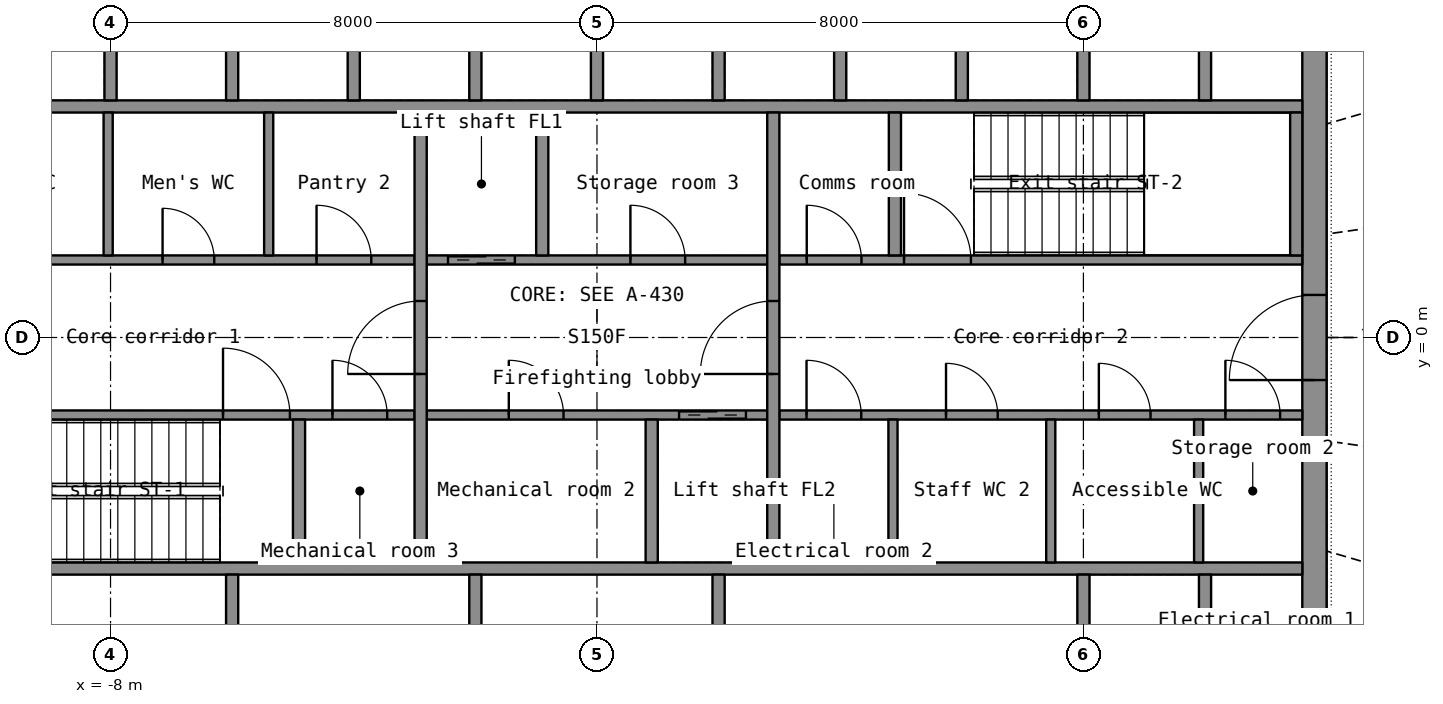
"""IFC4 building model, lengths in metres.
Left out: names, types, materials, properties, quantities, classifications, styles, units other than length and angle.
Written with IfcOpenShell. Run it as: python <this file> out.ifc"""

import sys

from ifc_helpers import new_model, si_unit, direction, frame, frame_2d, origin, place, context, subcontext, project, spatial, rectangle, extrude, element, fill, save


model = new_model("IFC4")
c1 = context("Model", 3, precision=1e-05, world=origin(), true_north=direction((0.0, 1.0)))
c2 = subcontext(c1, "Body", "Model", "MODEL_VIEW")
j1 = project(units=[si_unit("LENGTHUNIT", "METRE"), si_unit("PLANEANGLEUNIT", "RADIAN")], contexts=[c1])
p1 = place(None, origin())
s1 = spatial("IfcSite", under=j1, at=p1, CompositionType="ELEMENT")
p2 = place(p1, origin())
s2 = spatial("IfcBuilding", under=s1, at=p2, CompositionType="ELEMENT")
p3 = place(p2, frame((0.0, 0.0, 228.2)))
s3 = spatial("IfcBuildingStorey", under=s2, at=p3, CompositionType="ELEMENT", Elevation=228.2)
p4 = place(p3, frame((11.8, -7.2, 0.0), z_axis=(0.0, 0.0, 1.0), x_axis=(0.0, 1.0, 0.0)))
e1 = element("IfcWall", 1, at=p4, inside=s3, PredefinedType="SHEAR", context=c2, shape_type="SweptSolid", body=[
    extrude(rectangle(XDim=14.4, YDim=0.4, at=frame_2d((7.2, 0.0))), origin(), (0.0, 0.0, 1.0), 3.3),
])
p5 = place(p4, frame((6.5, 0.0, 0.0)))
e2 = element("IfcOpeningElement", 2, at=p5, cuts=e1, PredefinedType="OPENING", context=c2, shape_type="SweptSolid", body=[
    extrude(rectangle(XDim=1.4, YDim=2.2, at=frame_2d((0.7, 1.1))), frame((0.0, 0.21, 0.0), z_axis=(0.0, -1.0, 0.0), x_axis=(1.0, 0.0, 0.0)), (0.0, 0.0, 1.0), 0.42),
])
for number, where, z_axis, x_axis in (
    (3, (-11.6, -3.8, 0.0), (0.0, 0.0, 1.0), (1.0, 0.0, 0.0)),
    (4, (-11.6, 3.8, 0.0), (0.0, 0.0, 1.0), (1.0, 0.0, 0.0)),
):
    element("IfcWall", number, at=place(p3, frame(where, z_axis=z_axis, x_axis=x_axis)), inside=s3, PredefinedType="SHEAR", context=c2, shape_type="SweptSolid", body=[
        extrude(rectangle(XDim=23.2, YDim=0.2, at=frame_2d((11.6, 0.0))), origin(), (0.0, 0.0, 1.0), 3.3),
    ])
for number, where, z_axis, x_axis in (
    (5, (8.0, -6.8, 0.0), (0.0, 0.0, 1.0), (0.0, 1.0, 0.0)),
    (6, (10.0, -6.8, 0.0), (0.0, 0.0, 1.0), (0.0, 1.0, 0.0)),
):
    element("IfcWall", number, at=place(p3, frame(where, z_axis=z_axis, x_axis=x_axis)), inside=s3, PredefinedType="SHEAR", context=c2, shape_type="SweptSolid", body=[
        extrude(rectangle(XDim=2.9, YDim=0.2, at=frame_2d((1.45, 0.0))), origin(), (0.0, 0.0, 1.0), 3.3),
    ])
for number, where, z_axis, x_axis in (
    (7, (-6.0, -6.8, 0.0), (0.0, 0.0, 1.0), (0.0, 1.0, 0.0)),
    (8, (-2.0, -6.8, 0.0), (0.0, 0.0, 1.0), (0.0, 1.0, 0.0)),
    (9, (2.0, -6.8, 0.0), (0.0, 0.0, 1.0), (0.0, 1.0, 0.0)),
):
    element("IfcWall", number, at=place(p3, frame(where, z_axis=z_axis, x_axis=x_axis)), inside=s3, PredefinedType="PARTITIONING", context=c2, shape_type="SweptSolid", body=[
        extrude(rectangle(XDim=2.9, YDim=0.2, at=frame_2d((1.45, 0.0))), origin(), (0.0, 0.0, 1.0), 3.3),
    ])
for number, where, z_axis, x_axis in (
    (10, (-8.0, 3.9, 0.0), (0.0, 0.0, 1.0), (0.0, 1.0, 0.0)),
    (11, (-6.0, 3.9, 0.0), (0.0, 0.0, 1.0), (0.0, 1.0, 0.0)),
    (12, (-4.0, 3.9, 0.0), (0.0, 0.0, 1.0), (0.0, 1.0, 0.0)),
    (13, (-2.0, 3.9, 0.0), (0.0, 0.0, 1.0), (0.0, 1.0, 0.0)),
    (14, (0.0, 3.9, 0.0), (0.0, 0.0, 1.0), (0.0, 1.0, 0.0)),
    (15, (2.0, 3.9, 0.0), (0.0, 0.0, 1.0), (0.0, 1.0, 0.0)),
    (16, (4.0, 3.9, 0.0), (0.0, 0.0, 1.0), (0.0, 1.0, 0.0)),
    (17, (6.0, 3.9, 0.0), (0.0, 0.0, 1.0), (0.0, 1.0, 0.0)),
    (18, (8.0, 3.9, 0.0), (0.0, 0.0, 1.0), (0.0, 1.0, 0.0)),
    (19, (10.0, 3.9, 0.0), (0.0, 0.0, 1.0), (0.0, 1.0, 0.0)),
):
    element("IfcWall", number, at=place(p3, frame(where, z_axis=z_axis, x_axis=x_axis)), inside=s3, PredefinedType="SHEAR", context=c2, shape_type="SweptSolid", body=[
        extrude(rectangle(XDim=2.9, YDim=0.2, at=frame_2d((1.45, 0.0))), origin(), (0.0, 0.0, 1.0), 3.3),
    ])
p6 = place(p3, frame((-11.6, -1.275, 0.0), z_axis=(0.0, 0.0, 1.0), x_axis=(1.0, 0.0, 0.0)))
e20 = element("IfcWall", 20, at=p6, inside=s3, PredefinedType="SHEAR", context=c2, shape_type="SweptSolid", body=[
    extrude(rectangle(XDim=8.6, YDim=0.15, at=frame_2d((4.3, 0.0))), origin(), (0.0, 0.0, 1.0), 3.3),
])
p7 = place(p6, frame((5.45, 0.0, 0.0)))
e21 = element("IfcOpeningElement", 21, at=p7, cuts=e20, PredefinedType="OPENING", context=c2, shape_type="SweptSolid", body=[
    extrude(rectangle(XDim=1.1, YDim=2.15, at=frame_2d((0.55, 1.075))), frame((0.0, 0.085, 0.0), z_axis=(0.0, -1.0, 0.0), x_axis=(1.0, 0.0, 0.0)), (0.0, 0.0, 1.0), 0.17),
])
p8 = place(p6, frame((7.25, 0.0, 0.0)))
e22 = element("IfcOpeningElement", 22, at=p8, cuts=e20, PredefinedType="OPENING", context=c2, shape_type="SweptSolid", body=[
    extrude(rectangle(XDim=0.9, YDim=2.1, at=frame_2d((0.45, 1.05))), frame((0.0, 0.085, 0.0), z_axis=(0.0, -1.0, 0.0), x_axis=(1.0, 0.0, 0.0)), (0.0, 0.0, 1.0), 0.17),
])
p9 = place(p3, frame((-2.8, -1.275, 0.0), z_axis=(0.0, 0.0, 1.0), x_axis=(1.0, 0.0, 0.0)))
e23 = element("IfcWall", 23, at=p9, inside=s3, PredefinedType="SHEAR", context=c2, shape_type="SweptSolid", body=[
    extrude(rectangle(XDim=5.6, YDim=0.15, at=frame_2d((2.8, 0.0))), origin(), (0.0, 0.0, 1.0), 3.3),
])
p10 = place(p9, frame((4.15, 0.0, 0.0)))
e24 = element("IfcOpeningElement", 24, at=p10, cuts=e23, PredefinedType="OPENING", context=c2, shape_type="SweptSolid", body=[
    extrude(rectangle(XDim=1.1, YDim=2.2, at=frame_2d((0.55, 1.1))), frame((0.0, 0.085, 0.0), z_axis=(0.0, -1.0, 0.0), x_axis=(1.0, 0.0, 0.0)), (0.0, 0.0, 1.0), 0.17),
])
p11 = place(p9, frame((1.35, 0.0, 0.0)))
e25 = element("IfcOpeningElement", 25, at=p11, cuts=e23, PredefinedType="OPENING", context=c2, shape_type="SweptSolid", body=[
    extrude(rectangle(XDim=0.9, YDim=2.1, at=frame_2d((0.45, 1.05))), frame((0.0, 0.085, 0.0), z_axis=(0.0, -1.0, 0.0), x_axis=(1.0, 0.0, 0.0)), (0.0, 0.0, 1.0), 0.17),
])
p12 = place(p3, frame((3.0, -1.275, 0.0), z_axis=(0.0, 0.0, 1.0), x_axis=(1.0, 0.0, 0.0)))
e26 = element("IfcWall", 26, at=p12, inside=s3, PredefinedType="PARTITIONING", context=c2, shape_type="SweptSolid", body=[
    extrude(rectangle(XDim=8.6, YDim=0.15, at=frame_2d((4.3, 0.0))), origin(), (0.0, 0.0, 1.0), 3.3),
])
p13 = place(p12, frame((0.447, 0.0, 0.0)))
e27 = element("IfcOpeningElement", 27, at=p13, cuts=e26, PredefinedType="OPENING", context=c2, shape_type="SweptSolid", body=[
    extrude(rectangle(XDim=0.9, YDim=2.1, at=frame_2d((0.45, 1.05))), frame((0.0, 0.085, 0.0), z_axis=(0.0, -1.0, 0.0), x_axis=(1.0, 0.0, 0.0)), (0.0, 0.0, 1.0), 0.17),
])
p14 = place(p12, frame((2.74, 0.0, 0.0)))
e28 = element("IfcOpeningElement", 28, at=p14, cuts=e26, PredefinedType="OPENING", context=c2, shape_type="SweptSolid", body=[
    extrude(rectangle(XDim=0.85, YDim=2.1, at=frame_2d((0.425, 1.05))), frame((0.0, 0.085, 0.0), z_axis=(0.0, -1.0, 0.0), x_axis=(1.0, 0.0, 0.0)), (0.0, 0.0, 1.0), 0.17),
])
p15 = place(p12, frame((5.254, 0.0, 0.0)))
e29 = element("IfcOpeningElement", 29, at=p15, cuts=e26, PredefinedType="OPENING", context=c2, shape_type="SweptSolid", body=[
    extrude(rectangle(XDim=0.85, YDim=2.1, at=frame_2d((0.425, 1.05))), frame((0.0, 0.085, 0.0), z_axis=(0.0, -1.0, 0.0), x_axis=(1.0, 0.0, 0.0)), (0.0, 0.0, 1.0), 0.17),
])
p16 = place(p12, frame((7.335, 0.0, 0.0)))
e30 = element("IfcOpeningElement", 30, at=p16, cuts=e26, PredefinedType="OPENING", context=c2, shape_type="SweptSolid", body=[
    extrude(rectangle(XDim=0.9, YDim=2.1, at=frame_2d((0.45, 1.05))), frame((0.0, 0.085, 0.0), z_axis=(0.0, -1.0, 0.0), x_axis=(1.0, 0.0, 0.0)), (0.0, 0.0, 1.0), 0.17),
])
p17 = place(p3, frame((-11.6, 1.275, 0.0), z_axis=(0.0, 0.0, 1.0), x_axis=(1.0, 0.0, 0.0)))
e31 = element("IfcWall", 31, at=p17, inside=s3, PredefinedType="PARTITIONING", context=c2, shape_type="SweptSolid", body=[
    extrude(rectangle(XDim=8.6, YDim=0.15, at=frame_2d((4.3, 0.0))), origin(), (0.0, 0.0, 1.0), 3.3),
])
p18 = place(p17, frame((1.318, 0.0, 0.0)))
e32 = element("IfcOpeningElement", 32, at=p18, cuts=e31, PredefinedType="OPENING", context=c2, shape_type="SweptSolid", body=[
    extrude(rectangle(XDim=0.85, YDim=2.1, at=frame_2d((0.425, 1.05))), frame((0.0, 0.085, 0.0), z_axis=(0.0, -1.0, 0.0), x_axis=(1.0, 0.0, 0.0)), (0.0, 0.0, 1.0), 0.17),
])
p19 = place(p17, frame((4.456, 0.0, 0.0)))
e33 = element("IfcOpeningElement", 33, at=p19, cuts=e31, PredefinedType="OPENING", context=c2, shape_type="SweptSolid", body=[
    extrude(rectangle(XDim=0.85, YDim=2.1, at=frame_2d((0.425, 1.05))), frame((0.0, 0.085, 0.0), z_axis=(0.0, -1.0, 0.0), x_axis=(1.0, 0.0, 0.0)), (0.0, 0.0, 1.0), 0.17),
])
p20 = place(p17, frame((6.988, 0.0, 0.0)))
e34 = element("IfcOpeningElement", 34, at=p20, cuts=e31, PredefinedType="OPENING", context=c2, shape_type="SweptSolid", body=[
    extrude(rectangle(XDim=0.9, YDim=2.1, at=frame_2d((0.45, 1.05))), frame((0.0, 0.085, 0.0), z_axis=(0.0, -1.0, 0.0), x_axis=(1.0, 0.0, 0.0)), (0.0, 0.0, 1.0), 0.17),
])
p21 = place(p3, frame((-2.8, 1.275, 0.0), z_axis=(0.0, 0.0, 1.0), x_axis=(1.0, 0.0, 0.0)))
e35 = element("IfcWall", 35, at=p21, inside=s3, PredefinedType="SHEAR", context=c2, shape_type="SweptSolid", body=[
    extrude(rectangle(XDim=5.6, YDim=0.15, at=frame_2d((2.8, 0.0))), origin(), (0.0, 0.0, 1.0), 3.3),
])
p22 = place(p21, frame((0.35, 0.0, 0.0)))
e36 = element("IfcOpeningElement", 36, at=p22, cuts=e35, PredefinedType="OPENING", context=c2, shape_type="SweptSolid", body=[
    extrude(rectangle(XDim=1.1, YDim=2.2, at=frame_2d((0.55, 1.1))), frame((0.0, 0.085, 0.0), z_axis=(0.0, -1.0, 0.0), x_axis=(1.0, 0.0, 0.0)), (0.0, 0.0, 1.0), 0.17),
])
p23 = place(p21, frame((3.35, 0.0, 0.0)))
e37 = element("IfcOpeningElement", 37, at=p23, cuts=e35, PredefinedType="OPENING", context=c2, shape_type="SweptSolid", body=[
    extrude(rectangle(XDim=0.9, YDim=2.1, at=frame_2d((0.45, 1.05))), frame((0.0, 0.085, 0.0), z_axis=(0.0, -1.0, 0.0), x_axis=(1.0, 0.0, 0.0)), (0.0, 0.0, 1.0), 0.17),
])
p24 = place(p3, frame((3.0, 1.275, 0.0), z_axis=(0.0, 0.0, 1.0), x_axis=(1.0, 0.0, 0.0)))
e38 = element("IfcWall", 38, at=p24, inside=s3, PredefinedType="SHEAR", context=c2, shape_type="SweptSolid", body=[
    extrude(rectangle(XDim=8.6, YDim=0.15, at=frame_2d((4.3, 0.0))), origin(), (0.0, 0.0, 1.0), 3.3),
])
p25 = place(p24, frame((2.05, 0.0, 0.0)))
e39 = element("IfcOpeningElement", 39, at=p25, cuts=e38, PredefinedType="OPENING", context=c2, shape_type="SweptSolid", body=[
    extrude(rectangle(XDim=1.1, YDim=2.15, at=frame_2d((0.55, 1.075))), frame((0.0, 0.085, 0.0), z_axis=(0.0, -1.0, 0.0), x_axis=(1.0, 0.0, 0.0)), (0.0, 0.0, 1.0), 0.17),
])
p26 = place(p24, frame((0.45, 0.0, 0.0)))
e40 = element("IfcOpeningElement", 40, at=p26, cuts=e38, PredefinedType="OPENING", context=c2, shape_type="SweptSolid", body=[
    extrude(rectangle(XDim=0.9, YDim=2.1, at=frame_2d((0.45, 1.05))), frame((0.0, 0.085, 0.0), z_axis=(0.0, -1.0, 0.0), x_axis=(1.0, 0.0, 0.0)), (0.0, 0.0, 1.0), 0.17),
])
p27 = place(p3, frame((-2.9, -3.7, 0.0), z_axis=(0.0, 0.0, 1.0), x_axis=(0.0, 1.0, 0.0)))
e41 = element("IfcWall", 41, at=p27, inside=s3, PredefinedType="SHEAR", context=c2, shape_type="SweptSolid", body=[
    extrude(rectangle(XDim=7.4, YDim=0.2, at=frame_2d((3.7, 0.0))), origin(), (0.0, 0.0, 1.0), 3.3),
])
p28 = place(p27, frame((3.1, 0.0, 0.0)))
e42 = element("IfcOpeningElement", 42, at=p28, cuts=e41, PredefinedType="OPENING", context=c2, shape_type="SweptSolid", body=[
    extrude(rectangle(XDim=1.2, YDim=2.2, at=frame_2d((0.6, 1.1))), frame((0.0, 0.11, 0.0), z_axis=(0.0, -1.0, 0.0), x_axis=(1.0, 0.0, 0.0)), (0.0, 0.0, 1.0), 0.22),
])
p29 = place(p3, frame((2.9, -3.7, 0.0), z_axis=(0.0, 0.0, 1.0), x_axis=(0.0, 1.0, 0.0)))
e43 = element("IfcWall", 43, at=p29, inside=s3, PredefinedType="SHEAR", context=c2, shape_type="SweptSolid", body=[
    extrude(rectangle(XDim=7.4, YDim=0.2, at=frame_2d((3.7, 0.0))), origin(), (0.0, 0.0, 1.0), 3.3),
])
p30 = place(p29, frame((3.1, 0.0, 0.0)))
e44 = element("IfcOpeningElement", 44, at=p30, cuts=e43, PredefinedType="OPENING", context=c2, shape_type="SweptSolid", body=[
    extrude(rectangle(XDim=1.2, YDim=2.2, at=frame_2d((0.6, 1.1))), frame((0.0, 0.11, 0.0), z_axis=(0.0, -1.0, 0.0), x_axis=(1.0, 0.0, 0.0)), (0.0, 0.0, 1.0), 0.22),
])
for number, where, z_axis, x_axis in (
    (45, (-0.9, 1.35, 0.0), (0.0, 0.0, 1.0), (0.0, 1.0, 0.0)),
    (46, (0.9, -3.7, 0.0), (0.0, 0.0, 1.0), (0.0, 1.0, 0.0)),
    (47, (11.5, 1.35, 0.0), (0.0, 0.0, 1.0), (0.0, 1.0, 0.0)),
    (48, (-4.9, -3.7, 0.0), (0.0, 0.0, 1.0), (0.0, 1.0, 0.0)),
    (49, (4.9, 1.35, 0.0), (0.0, 0.0, 1.0), (0.0, 1.0, 0.0)),
):
    element("IfcWall", number, at=place(p3, frame(where, z_axis=z_axis, x_axis=x_axis)), inside=s3, PredefinedType="SHEAR", context=c2, shape_type="SweptSolid", body=[
        extrude(rectangle(XDim=2.35, YDim=0.2, at=frame_2d((1.175, 0.0))), origin(), (0.0, 0.0, 1.0), 3.3),
    ])
for number, where, z_axis, x_axis in (
    (50, (-8.039, 1.35, 0.0), (0.0, 0.0, 1.0), (0.0, 1.0, 0.0)),
    (51, (-5.399, 1.35, 0.0), (0.0, 0.0, 1.0), (0.0, 1.0, 0.0)),
    (52, (4.868, -3.7, 0.0), (0.0, 0.0, 1.0), (0.0, 1.0, 0.0)),
    (53, (7.463, -3.7, 0.0), (0.0, 0.0, 1.0), (0.0, 1.0, 0.0)),
    (54, (9.895, -3.7, 0.0), (0.0, 0.0, 1.0), (0.0, 1.0, 0.0)),
):
    element("IfcWall", number, at=place(p3, frame(where, z_axis=z_axis, x_axis=x_axis)), inside=s3, PredefinedType="PARTITIONING", context=c2, shape_type="SweptSolid", body=[
        extrude(rectangle(XDim=2.35, YDim=0.15, at=frame_2d((1.175, 0.0))), origin(), (0.0, 0.0, 1.0), 3.3),
    ])
p31 = place(p5, origin())
e55 = element("IfcDoor", 55, at=p31, inside=s3, OperationType="DOUBLE_DOOR_SINGLE_SWING", PredefinedType="DOOR", context=c2, shape_type="SweptSolid", body=[
    extrude(rectangle(XDim=1.4, YDim=2.2, at=frame_2d((0.7, 1.1))), frame((0.0, 0.025, 0.0), z_axis=(0.0, -1.0, 0.0), x_axis=(1.0, 0.0, 0.0)), (0.0, 0.0, 1.0), 0.05),
])
fill(e2, e55)
p32 = place(p28, origin())
e56 = element("IfcDoor", 56, at=p32, inside=s3, OperationType="SINGLE_SWING_LEFT", PredefinedType="DOOR", context=c2, shape_type="SweptSolid", body=[
    extrude(rectangle(XDim=1.2, YDim=2.2, at=frame_2d((0.6, 1.1))), frame((0.0, 0.025, 0.0), z_axis=(0.0, -1.0, 0.0), x_axis=(1.0, 0.0, 0.0)), (0.0, 0.0, 1.0), 0.05),
])
fill(e42, e56)
p33 = place(p30, origin())
e57 = element("IfcDoor", 57, at=p33, inside=s3, OperationType="SINGLE_SWING_LEFT", PredefinedType="DOOR", context=c2, shape_type="SweptSolid", body=[
    extrude(rectangle(XDim=1.2, YDim=2.2, at=frame_2d((0.6, 1.1))), frame((0.0, 0.025, 0.0), z_axis=(0.0, -1.0, 0.0), x_axis=(1.0, 0.0, 0.0)), (0.0, 0.0, 1.0), 0.05),
])
fill(e44, e57)
p34 = place(p22, origin())
e58 = element("IfcDoor", 58, at=p34, inside=s3, OperationType="DOUBLE_DOOR_SLIDING", PredefinedType="DOOR", context=c2, shape_type="SweptSolid", body=[
    extrude(rectangle(XDim=1.1, YDim=2.2, at=frame_2d((0.55, 1.1))), frame((0.0, 0.025, 0.0), z_axis=(0.0, -1.0, 0.0), x_axis=(1.0, 0.0, 0.0)), (0.0, 0.0, 1.0), 0.05),
])
fill(e36, e58)
p35 = place(p10, origin())
e59 = element("IfcDoor", 59, at=p35, inside=s3, OperationType="DOUBLE_DOOR_SLIDING", PredefinedType="DOOR", context=c2, shape_type="SweptSolid", body=[
    extrude(rectangle(XDim=1.1, YDim=2.2, at=frame_2d((0.55, 1.1))), frame((0.0, 0.025, 0.0), z_axis=(0.0, -1.0, 0.0), x_axis=(1.0, 0.0, 0.0)), (0.0, 0.0, 1.0), 0.05),
])
fill(e24, e59)
p36 = place(p7, origin())
e60 = element("IfcDoor", 60, at=p36, inside=s3, OperationType="SINGLE_SWING_LEFT", PredefinedType="DOOR", context=c2, shape_type="SweptSolid", body=[
    extrude(rectangle(XDim=1.1, YDim=2.15, at=frame_2d((0.55, 1.075))), frame((0.0, 0.025, 0.0), z_axis=(0.0, -1.0, 0.0), x_axis=(1.0, 0.0, 0.0)), (0.0, 0.0, 1.0), 0.05),
])
fill(e21, e60)
p37 = place(p25, origin())
e61 = element("IfcDoor", 61, at=p37, inside=s3, OperationType="SINGLE_SWING_LEFT", PredefinedType="DOOR", context=c2, shape_type="SweptSolid", body=[
    extrude(rectangle(XDim=1.1, YDim=2.15, at=frame_2d((0.55, 1.075))), frame((0.0, 0.025, 0.0), z_axis=(0.0, -1.0, 0.0), x_axis=(1.0, 0.0, 0.0)), (0.0, 0.0, 1.0), 0.05),
])
fill(e39, e61)
p38 = place(p19, origin())
e62 = element("IfcDoor", 62, at=p38, inside=s3, OperationType="SINGLE_SWING_LEFT", PredefinedType="DOOR", context=c2, shape_type="SweptSolid", body=[
    extrude(rectangle(XDim=0.85, YDim=2.1, at=frame_2d((0.425, 1.05))), frame((0.0, 0.025, 0.0), z_axis=(0.0, -1.0, 0.0), x_axis=(1.0, 0.0, 0.0)), (0.0, 0.0, 1.0), 0.05),
])
fill(e33, e62)
p39 = place(p20, origin())
e63 = element("IfcDoor", 63, at=p39, inside=s3, OperationType="SINGLE_SWING_LEFT", PredefinedType="DOOR", context=c2, shape_type="SweptSolid", body=[
    extrude(rectangle(XDim=0.9, YDim=2.1, at=frame_2d((0.45, 1.05))), frame((0.0, 0.025, 0.0), z_axis=(0.0, -1.0, 0.0), x_axis=(1.0, 0.0, 0.0)), (0.0, 0.0, 1.0), 0.05),
])
fill(e34, e63)
p40 = place(p13, origin())
e64 = element("IfcDoor", 64, at=p40, inside=s3, OperationType="SINGLE_SWING_LEFT", PredefinedType="DOOR", context=c2, shape_type="SweptSolid", body=[
    extrude(rectangle(XDim=0.9, YDim=2.1, at=frame_2d((0.45, 1.05))), frame((0.0, 0.025, 0.0), z_axis=(0.0, -1.0, 0.0), x_axis=(1.0, 0.0, 0.0)), (0.0, 0.0, 1.0), 0.05),
])
fill(e27, e64)
p41 = place(p14, origin())
e65 = element("IfcDoor", 65, at=p41, inside=s3, OperationType="SINGLE_SWING_LEFT", PredefinedType="DOOR", context=c2, shape_type="SweptSolid", body=[
    extrude(rectangle(XDim=0.85, YDim=2.1, at=frame_2d((0.425, 1.05))), frame((0.0, 0.025, 0.0), z_axis=(0.0, -1.0, 0.0), x_axis=(1.0, 0.0, 0.0)), (0.0, 0.0, 1.0), 0.05),
])
fill(e28, e65)
p42 = place(p15, origin())
e66 = element("IfcDoor", 66, at=p42, inside=s3, OperationType="SINGLE_SWING_LEFT", PredefinedType="DOOR", context=c2, shape_type="SweptSolid", body=[
    extrude(rectangle(XDim=0.85, YDim=2.1, at=frame_2d((0.425, 1.05))), frame((0.0, 0.025, 0.0), z_axis=(0.0, -1.0, 0.0), x_axis=(1.0, 0.0, 0.0)), (0.0, 0.0, 1.0), 0.05),
])
fill(e29, e66)
p43 = place(p16, origin())
e67 = element("IfcDoor", 67, at=p43, inside=s3, OperationType="SINGLE_SWING_LEFT", PredefinedType="DOOR", context=c2, shape_type="SweptSolid", body=[
    extrude(rectangle(XDim=0.9, YDim=2.1, at=frame_2d((0.45, 1.05))), frame((0.0, 0.025, 0.0), z_axis=(0.0, -1.0, 0.0), x_axis=(1.0, 0.0, 0.0)), (0.0, 0.0, 1.0), 0.05),
])
fill(e30, e67)
p44 = place(p23, origin())
e68 = element("IfcDoor", 68, at=p44, inside=s3, OperationType="SINGLE_SWING_LEFT", PredefinedType="DOOR", context=c2, shape_type="SweptSolid", body=[
    extrude(rectangle(XDim=0.9, YDim=2.1, at=frame_2d((0.45, 1.05))), frame((0.0, 0.025, 0.0), z_axis=(0.0, -1.0, 0.0), x_axis=(1.0, 0.0, 0.0)), (0.0, 0.0, 1.0), 0.05),
])
fill(e37, e68)
p45 = place(p11, origin())
e69 = element("IfcDoor", 69, at=p45, inside=s3, OperationType="SINGLE_SWING_LEFT", PredefinedType="DOOR", context=c2, shape_type="SweptSolid", body=[
    extrude(rectangle(XDim=0.9, YDim=2.1, at=frame_2d((0.45, 1.05))), frame((0.0, 0.025, 0.0), z_axis=(0.0, -1.0, 0.0), x_axis=(1.0, 0.0, 0.0)), (0.0, 0.0, 1.0), 0.05),
])
fill(e25, e69)
p46 = place(p26, origin())
e70 = element("IfcDoor", 70, at=p46, inside=s3, OperationType="SINGLE_SWING_LEFT", PredefinedType="DOOR", context=c2, shape_type="SweptSolid", body=[
    extrude(rectangle(XDim=0.9, YDim=2.1, at=frame_2d((0.45, 1.05))), frame((0.0, 0.025, 0.0), z_axis=(0.0, -1.0, 0.0), x_axis=(1.0, 0.0, 0.0)), (0.0, 0.0, 1.0), 0.05),
])
fill(e40, e70)
p47 = place(p8, origin())
e71 = element("IfcDoor", 71, at=p47, inside=s3, OperationType="SINGLE_SWING_LEFT", PredefinedType="DOOR", context=c2, shape_type="SweptSolid", body=[
    extrude(rectangle(XDim=0.9, YDim=2.1, at=frame_2d((0.45, 1.05))), frame((0.0, 0.025, 0.0), z_axis=(0.0, -1.0, 0.0), x_axis=(1.0, 0.0, 0.0)), (0.0, 0.0, 1.0), 0.05),
])
fill(e22, e71)
save(model, sys.argv[1])
